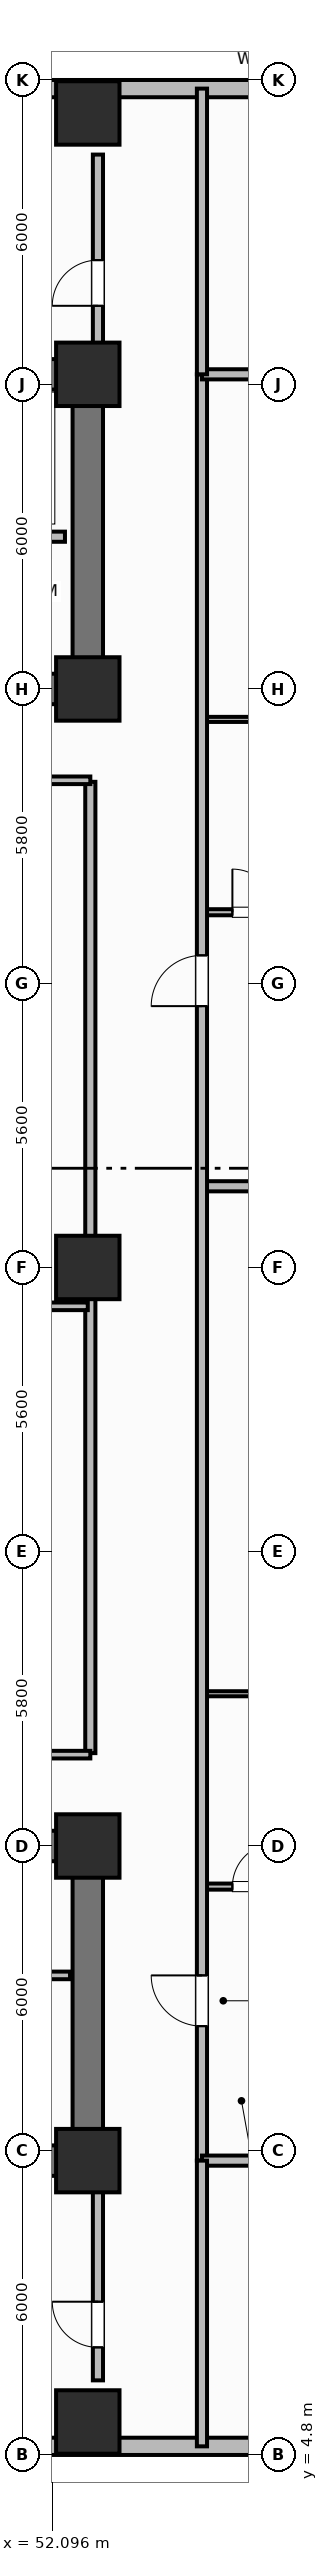
"""IFC4 building model, lengths in metres.
Left out: names, types, materials, properties, quantities, classifications, styles, units other than length and angle.
Written with IfcOpenShell. Run it as: python <this file> out.ifc"""

import sys

from ifc_helpers import new_model, si_unit, direction, frame, frame_2d, origin, origin_2d, place, context, subcontext, project, spatial, rectangle, extrude, element, fill, save


model = new_model("IFC4")
c1 = context("Model", 3, precision=1e-05, world=origin(), true_north=direction((0.0, 1.0)))
c2 = subcontext(c1, "Body", "Model", "MODEL_VIEW")
j1 = project(units=[si_unit("LENGTHUNIT", "METRE"), si_unit("PLANEANGLEUNIT", "RADIAN")], contexts=[c1])
p1 = place(None, origin())
s1 = spatial("IfcSite", under=j1, at=p1, CompositionType="ELEMENT")
p2 = place(p1, origin())
s2 = spatial("IfcBuilding", under=s1, at=p2, CompositionType="ELEMENT")
p3 = place(p2, frame((0.0, 0.0, 47.3)))
s3 = spatial("IfcBuildingStorey", under=s2, at=p3, CompositionType="ELEMENT", Elevation=47.3)
p4 = place(p3, frame((52.8, 10.6, 0.0), z_axis=(0.0, 0.0, 1.0), x_axis=(-1.0, 0.0, 0.0)))
e1 = element("IfcWall", 1, at=p4, inside=s3, PredefinedType="SHEAR", context=c2, shape_type="SweptSolid", body=[
    extrude(rectangle(XDim=27.2, YDim=0.6, at=frame_2d((13.6, 0.0))), origin(), (0.0, 0.0, 1.0), 3.7),
])
p5 = place(p3, frame((52.8, 10.9, 0.0), z_axis=(0.0, 0.0, 1.0), x_axis=(0.0, 1.0, 0.0)))
e2 = element("IfcWall", 2, at=p5, inside=s3, PredefinedType="SHEAR", context=c2, shape_type="SweptSolid", body=[
    extrude(rectangle(XDim=5.6, YDim=0.6, at=frame_2d((2.8, 0.0))), origin(), (0.0, 0.0, 1.0), 3.7),
])
p6 = place(p3, frame((25.6, 16.8, 0.0), z_axis=(0.0, 0.0, 1.0), x_axis=(1.0, 0.0, 0.0)))
e3 = element("IfcWall", 3, at=p6, inside=s3, PredefinedType="SHEAR", context=c2, shape_type="SweptSolid", body=[
    extrude(rectangle(XDim=27.2, YDim=0.6, at=frame_2d((13.6, 0.0))), origin(), (0.0, 0.0, 1.0), 3.7),
])
p7 = place(p6, frame((1.8, 0.0, 0.0)))
e4 = element("IfcOpeningElement", 4, at=p7, cuts=e3, PredefinedType="OPENING", context=c2, shape_type="SweptSolid", body=[
    extrude(rectangle(XDim=1.1, YDim=2.15, at=frame_2d((0.55, 1.075))), frame((0.0, 0.31, 0.0), z_axis=(0.0, -1.0, 0.0), x_axis=(1.0, 0.0, 0.0)), (0.0, 0.0, 1.0), 0.62),
])
p8 = place(p6, frame((5.6, 0.0, 0.0)))
e5 = element("IfcOpeningElement", 5, at=p8, cuts=e3, PredefinedType="OPENING", context=c2, shape_type="SweptSolid", body=[
    extrude(rectangle(XDim=0.85, YDim=2.1, at=frame_2d((0.425, 1.05))), frame((0.0, 0.31, 0.0), z_axis=(0.0, -1.0, 0.0), x_axis=(1.0, 0.0, 0.0)), (0.0, 0.0, 1.0), 0.62),
])
p9 = place(p6, frame((13.0, 0.0, 0.0)))
e6 = element("IfcOpeningElement", 6, at=p9, cuts=e3, PredefinedType="OPENING", context=c2, shape_type="SweptSolid", body=[
    extrude(rectangle(XDim=1.2, YDim=2.15, at=frame_2d((0.6, 1.075))), frame((0.0, 0.31, 0.0), z_axis=(0.0, -1.0, 0.0), x_axis=(1.0, 0.0, 0.0)), (0.0, 0.0, 1.0), 0.62),
])
p10 = place(p6, frame((20.4, 0.0, 0.0)))
e7 = element("IfcOpeningElement", 7, at=p10, cuts=e3, PredefinedType="OPENING", context=c2, shape_type="SweptSolid", body=[
    extrude(rectangle(XDim=1.3, YDim=2.2, at=frame_2d((0.65, 1.1))), frame((0.0, 0.31, 0.0), z_axis=(0.0, -1.0, 0.0), x_axis=(1.0, 0.0, 0.0)), (0.0, 0.0, 1.0), 0.62),
])
p11 = place(p6, frame((24.65, 0.0, 0.0)))
e8 = element("IfcOpeningElement", 8, at=p11, cuts=e3, PredefinedType="OPENING", context=c2, shape_type="SweptSolid", body=[
    extrude(rectangle(XDim=0.85, YDim=2.1, at=frame_2d((0.425, 1.05))), frame((0.0, 0.31, 0.0), z_axis=(0.0, -1.0, 0.0), x_axis=(1.0, 0.0, 0.0)), (0.0, 0.0, 1.0), 0.62),
])
p12 = place(p3, frame((25.6, 45.8, 0.0), z_axis=(0.0, 0.0, 1.0), x_axis=(1.0, 0.0, 0.0)))
e9 = element("IfcWall", 9, at=p12, inside=s3, PredefinedType="SHEAR", context=c2, shape_type="SweptSolid", body=[
    extrude(rectangle(XDim=27.2, YDim=0.6, at=frame_2d((13.6, 0.0))), origin(), (0.0, 0.0, 1.0), 3.7),
])
p13 = place(p3, frame((52.8, 39.9, 0.0), z_axis=(0.0, 0.0, 1.0), x_axis=(0.0, 1.0, 0.0)))
e10 = element("IfcWall", 10, at=p13, inside=s3, PredefinedType="SHEAR", context=c2, shape_type="SweptSolid", body=[
    extrude(rectangle(XDim=5.6, YDim=0.6, at=frame_2d((2.8, 0.0))), origin(), (0.0, 0.0, 1.0), 3.7),
])
p14 = place(p3, frame((52.8, 39.6, 0.0), z_axis=(0.0, 0.0, 1.0), x_axis=(-1.0, 0.0, 0.0)))
e11 = element("IfcWall", 11, at=p14, inside=s3, PredefinedType="SHEAR", context=c2, shape_type="SweptSolid", body=[
    extrude(rectangle(XDim=27.2, YDim=0.6, at=frame_2d((13.6, 0.0))), origin(), (0.0, 0.0, 1.0), 3.7),
])
p15 = place(p14, frame((24.2, 0.0, 0.0)))
e12 = element("IfcOpeningElement", 12, at=p15, cuts=e11, PredefinedType="OPENING", context=c2, shape_type="SweptSolid", body=[
    extrude(rectangle(XDim=1.1, YDim=2.15, at=frame_2d((0.55, 1.075))), frame((0.0, 0.31, 0.0), z_axis=(0.0, -1.0, 0.0), x_axis=(1.0, 0.0, 0.0)), (0.0, 0.0, 1.0), 0.62),
])
p16 = place(p14, frame((20.55, 0.0, 0.0)))
e13 = element("IfcOpeningElement", 13, at=p16, cuts=e11, PredefinedType="OPENING", context=c2, shape_type="SweptSolid", body=[
    extrude(rectangle(XDim=0.95, YDim=2.1, at=frame_2d((0.475, 1.05))), frame((0.0, 0.31, 0.0), z_axis=(0.0, -1.0, 0.0), x_axis=(1.0, 0.0, 0.0)), (0.0, 0.0, 1.0), 0.62),
])
p17 = place(p14, frame((15.1, 0.0, 0.0)))
e14 = element("IfcOpeningElement", 14, at=p17, cuts=e11, PredefinedType="OPENING", context=c2, shape_type="SweptSolid", body=[
    extrude(rectangle(XDim=1.2, YDim=2.15, at=frame_2d((0.6, 1.075))), frame((0.0, 0.31, 0.0), z_axis=(0.0, -1.0, 0.0), x_axis=(1.0, 0.0, 0.0)), (0.0, 0.0, 1.0), 0.62),
])
p18 = place(p14, frame((11.6, 0.0, 0.0)))
e15 = element("IfcOpeningElement", 15, at=p18, cuts=e11, PredefinedType="OPENING", context=c2, shape_type="SweptSolid", body=[
    extrude(rectangle(XDim=0.9, YDim=2.1, at=frame_2d((0.45, 1.05))), frame((0.0, 0.31, 0.0), z_axis=(0.0, -1.0, 0.0), x_axis=(1.0, 0.0, 0.0)), (0.0, 0.0, 1.0), 0.62),
])
p19 = place(p14, frame((4.8, 0.0, 0.0)))
e16 = element("IfcOpeningElement", 16, at=p19, cuts=e11, PredefinedType="OPENING", context=c2, shape_type="SweptSolid", body=[
    extrude(rectangle(XDim=0.85, YDim=2.1, at=frame_2d((0.425, 1.05))), frame((0.0, 0.31, 0.0), z_axis=(0.0, -1.0, 0.0), x_axis=(1.0, 0.0, 0.0)), (0.0, 0.0, 1.0), 0.62),
])
p20 = place(p14, frame((1.9, 0.0, 0.0)))
e17 = element("IfcOpeningElement", 17, at=p20, cuts=e11, PredefinedType="OPENING", context=c2, shape_type="SweptSolid", body=[
    extrude(rectangle(XDim=0.85, YDim=2.1, at=frame_2d((0.425, 1.05))), frame((0.0, 0.31, 0.0), z_axis=(0.0, -1.0, 0.0), x_axis=(1.0, 0.0, 0.0)), (0.0, 0.0, 1.0), 0.62),
])
for number, where, z_axis, x_axis in (
    (18, (52.8, 10.6, 0.0), (0.0, 0.0, 1.0), (1.0, 0.0, 0.0)),
    (19, (52.8, 16.8, 0.0), (0.0, 0.0, 1.0), (1.0, 0.0, 0.0)),
    (20, (52.8, 39.6, 0.0), (0.0, 0.0, 1.0), (1.0, 0.0, 0.0)),
    (21, (52.8, 45.8, 0.0), (0.0, 0.0, 1.0), (1.0, 0.0, 0.0)),
    (22, (52.8, 28.2, 0.0), (0.0, 0.0, 1.0), (1.0, 0.0, 0.0)),
    (23, (52.8, 5.45, 0.0), (0.0, 0.0, 1.0), (1.0, 0.0, 0.0)),
    (24, (52.8, 50.95, 0.0), (0.0, 0.0, 1.0), (1.0, 0.0, 0.0)),
):
    element("IfcColumn", number, at=place(p3, frame(where, z_axis=z_axis, x_axis=x_axis)), inside=s3, PredefinedType="COLUMN", context=c2, shape_type="SweptSolid", body=[
        extrude(rectangle(XDim=1.25, YDim=1.25, at=origin_2d()), origin(), (0.0, 0.0, 1.0), 3.7),
    ])
p21 = place(p3, frame((42.4, 4.97, 0.0), z_axis=(0.0, 0.0, 1.0), x_axis=(1.0, 0.0, 0.0)))
e25 = element("IfcWall", 25, at=p21, inside=s3, PredefinedType="SOLIDWALL", context=c2, shape_type="SweptSolid", body=[
    extrude(rectangle(XDim=17.4, YDim=0.34, at=frame_2d((8.7, 0.0))), origin(), (0.0, 0.0, 1.0), 2.7),
])
p22 = place(p21, frame((4.68, 0.0, 0.68)))
e26 = element("IfcOpeningElement", 26, at=p22, cuts=e25, PredefinedType="OPENING", context=c2, shape_type="SweptSolid", body=[
    extrude(rectangle(XDim=1.6, YDim=1.9, at=frame_2d((0.8, 0.95))), frame((0.0, 0.18, 0.0), z_axis=(0.0, -1.0, 0.0), x_axis=(1.0, 0.0, 0.0)), (0.0, 0.0, 1.0), 0.36),
])
p23 = place(p21, frame((7.55, 0.0, 0.68)))
e27 = element("IfcOpeningElement", 27, at=p23, cuts=e25, PredefinedType="OPENING", context=c2, shape_type="SweptSolid", body=[
    extrude(rectangle(XDim=1.6, YDim=1.9, at=frame_2d((0.8, 0.95))), frame((0.0, 0.18, 0.0), z_axis=(0.0, -1.0, 0.0), x_axis=(1.0, 0.0, 0.0)), (0.0, 0.0, 1.0), 0.36),
])
p24 = place(p21, frame((14.34, 0.0, 0.68)))
e28 = element("IfcOpeningElement", 28, at=p24, cuts=e25, PredefinedType="OPENING", context=c2, shape_type="SweptSolid", body=[
    extrude(rectangle(XDim=1.6, YDim=1.9, at=frame_2d((0.8, 0.95))), frame((0.0, 0.18, 0.0), z_axis=(0.0, -1.0, 0.0), x_axis=(1.0, 0.0, 0.0)), (0.0, 0.0, 1.0), 0.36),
])
p25 = place(p3, frame((59.8, 51.43, 0.0), z_axis=(0.0, 0.0, 1.0), x_axis=(-1.0, 0.0, 0.0)))
e29 = element("IfcWall", 29, at=p25, inside=s3, PredefinedType="SOLIDWALL", context=c2, shape_type="SweptSolid", body=[
    extrude(rectangle(XDim=17.4, YDim=0.34, at=frame_2d((8.7, 0.0))), origin(), (0.0, 0.0, 1.0), 2.7),
])
p26 = place(p25, frame((1.613, 0.0, 0.68)))
e30 = element("IfcOpeningElement", 30, at=p26, cuts=e29, PredefinedType="OPENING", context=c2, shape_type="SweptSolid", body=[
    extrude(rectangle(XDim=2.1, YDim=1.9, at=frame_2d((1.05, 0.95))), frame((0.0, 0.18, 0.0), z_axis=(0.0, -1.0, 0.0), x_axis=(1.0, 0.0, 0.0)), (0.0, 0.0, 1.0), 0.36),
])
p27 = place(p25, frame((9.663, 0.0, 0.68)))
e31 = element("IfcOpeningElement", 31, at=p27, cuts=e29, PredefinedType="OPENING", context=c2, shape_type="SweptSolid", body=[
    extrude(rectangle(XDim=2.1, YDim=1.9, at=frame_2d((1.05, 0.95))), frame((0.0, 0.18, 0.0), z_axis=(0.0, -1.0, 0.0), x_axis=(1.0, 0.0, 0.0)), (0.0, 0.0, 1.0), 0.36),
])
p28 = place(p3, frame((49.6, 14.25, 0.0), z_axis=(0.0, 0.0, 1.0), x_axis=(1.0, 0.0, 0.0)))
e32 = element("IfcWall", 32, at=p28, inside=s3, PredefinedType="PARTITIONING", context=c2, shape_type="SweptSolid", body=[
    extrude(rectangle(XDim=2.85, YDim=0.15, at=frame_2d((1.425, 0.0))), origin(), (0.0, 0.0, 1.0), 2.53),
])
p29 = place(p28, frame((0.9, 0.0, 0.0)))
e33 = element("IfcOpeningElement", 33, at=p29, cuts=e32, PredefinedType="OPENING", context=c2, shape_type="SweptSolid", body=[
    extrude(rectangle(XDim=0.85, YDim=2.1, at=frame_2d((0.425, 1.05))), frame((0.0, 0.085, 0.0), z_axis=(0.0, -1.0, 0.0), x_axis=(1.0, 0.0, 0.0)), (0.0, 0.0, 1.0), 0.17),
])
p30 = place(p3, frame((52.35, 42.6, 0.0), z_axis=(0.0, 0.0, 1.0), x_axis=(-1.0, 0.0, 0.0)))
e34 = element("IfcWall", 34, at=p30, inside=s3, PredefinedType="PARTITIONING", context=c2, shape_type="SweptSolid", body=[
    extrude(rectangle(XDim=8.8, YDim=0.2, at=frame_2d((4.4, 0.0))), origin(), (0.0, 0.0, 1.0), 2.53),
])
p31 = place(p3, frame((52.85, 18.63, 0.0), z_axis=(0.0, 0.0, 1.0), x_axis=(0.0, 1.0, 0.0)))
e35 = element("IfcWall", 35, at=p31, inside=s3, PredefinedType="PARTITIONING", context=c2, shape_type="SweptSolid", body=[
    extrude(rectangle(XDim=19.14, YDim=0.2, at=frame_2d((9.57, 0.0))), origin(), (0.0, 0.0, 1.0), 2.53),
])
for number, where, z_axis, x_axis in (
    (36, (40.35, 18.6, 0.0), (0.0, 0.0, 1.0), (1.0, 0.0, 0.0)),
    (37, (40.35, 37.8, 0.0), (0.0, 0.0, 1.0), (1.0, 0.0, 0.0)),
):
    element("IfcWall", number, at=place(p3, frame(where, z_axis=z_axis, x_axis=x_axis)), inside=s3, PredefinedType="PARTITIONING", context=c2, shape_type="SweptSolid", body=[
        extrude(rectangle(XDim=12.5, YDim=0.15, at=frame_2d((6.25, 0.0))), origin(), (0.0, 0.0, 1.0), 2.53),
    ])
p32 = place(p3, frame((40.38, 27.434, 0.0), z_axis=(0.0, 0.0, 1.0), x_axis=(1.0, 0.0, 0.0)))
e38 = element("IfcWall", 38, at=p32, inside=s3, PredefinedType="PARTITIONING", context=c2, shape_type="SweptSolid", body=[
    extrude(rectangle(XDim=12.42, YDim=0.15, at=frame_2d((6.21, 0.0))), origin(), (0.0, 0.0, 1.0), 2.53),
])
p33 = place(p3, frame((55.05, 16.0, 0.0), z_axis=(0.0, 0.0, 1.0), x_axis=(1.0, 0.0, 0.0)))
e39 = element("IfcWall", 39, at=p33, inside=s3, PredefinedType="PARTITIONING", context=c2, shape_type="SweptSolid", body=[
    extrude(rectangle(XDim=2.25, YDim=0.12, at=frame_2d((1.125, 0.0))), origin(), (0.0, 0.0, 1.0), 2.53),
])
p34 = place(p33, frame((0.6, 0.0, 0.0)))
e40 = element("IfcOpeningElement", 40, at=p34, cuts=e39, PredefinedType="OPENING", context=c2, shape_type="SweptSolid", body=[
    extrude(rectangle(XDim=0.85, YDim=2.1, at=frame_2d((0.425, 1.05))), frame((0.0, 0.07, 0.0), z_axis=(0.0, -1.0, 0.0), x_axis=(1.0, 0.0, 0.0)), (0.0, 0.0, 1.0), 0.14),
])
p35 = place(p3, frame((55.05, 19.8, 0.0), z_axis=(0.0, 0.0, 1.0), x_axis=(1.0, 0.0, 0.0)))
e41 = element("IfcWall", 41, at=p35, inside=s3, PredefinedType="PARTITIONING", context=c2, shape_type="SweptSolid", body=[
    extrude(rectangle(XDim=2.25, YDim=0.1, at=frame_2d((1.125, 0.0))), origin(), (0.0, 0.0, 1.0), 2.53),
])
p36 = place(p3, frame((55.05, 29.8, 0.0), z_axis=(0.0, 0.0, 1.0), x_axis=(1.0, 0.0, 0.0)))
e42 = element("IfcWall", 42, at=p36, inside=s3, PredefinedType="PARTITIONING", context=c2, shape_type="SweptSolid", body=[
    extrude(rectangle(XDim=8.066, YDim=0.2, at=frame_2d((4.033, 0.0))), origin(), (0.0, 0.0, 1.0), 2.53),
])
p37 = place(p3, frame((55.05, 35.2, 0.0), z_axis=(0.0, 0.0, 1.0), x_axis=(1.0, 0.0, 0.0)))
e43 = element("IfcWall", 43, at=p37, inside=s3, PredefinedType="PARTITIONING", context=c2, shape_type="SweptSolid", body=[
    extrude(rectangle(XDim=2.25, YDim=0.12, at=frame_2d((1.125, 0.0))), origin(), (0.0, 0.0, 1.0), 2.53),
])
p38 = place(p37, frame((0.6, 0.0, 0.0)))
e44 = element("IfcOpeningElement", 44, at=p38, cuts=e43, PredefinedType="OPENING", context=c2, shape_type="SweptSolid", body=[
    extrude(rectangle(XDim=0.85, YDim=2.1, at=frame_2d((0.425, 1.05))), frame((0.0, 0.07, 0.0), z_axis=(0.0, -1.0, 0.0), x_axis=(1.0, 0.0, 0.0)), (0.0, 0.0, 1.0), 0.14),
])
p39 = place(p3, frame((55.05, 39.0, 0.0), z_axis=(0.0, 0.0, 1.0), x_axis=(1.0, 0.0, 0.0)))
e45 = element("IfcWall", 45, at=p39, inside=s3, PredefinedType="PARTITIONING", context=c2, shape_type="SweptSolid", body=[
    extrude(rectangle(XDim=2.25, YDim=0.1, at=frame_2d((1.125, 0.0))), origin(), (0.0, 0.0, 1.0), 2.53),
])
p40 = place(p3, frame((55.05, 10.6, 0.0), z_axis=(0.0, 0.0, 1.0), x_axis=(0.0, 1.0, 0.0)))
e46 = element("IfcWall", 46, at=p40, inside=s3, PredefinedType="PARTITIONING", context=c2, shape_type="SweptSolid", body=[
    extrude(rectangle(XDim=35.2, YDim=0.2, at=frame_2d((17.6, 0.0))), origin(), (0.0, 0.0, 1.0), 2.53),
])
p41 = place(p40, frame((2.65, 0.0, 0.0)))
e47 = element("IfcOpeningElement", 47, at=p41, cuts=e46, PredefinedType="OPENING", context=c2, shape_type="SweptSolid", body=[
    extrude(rectangle(XDim=1.0, YDim=2.15, at=frame_2d((0.5, 1.075))), frame((0.0, 0.11, 0.0), z_axis=(0.0, -1.0, 0.0), x_axis=(1.0, 0.0, 0.0)), (0.0, 0.0, 1.0), 0.22),
])
p42 = place(p40, frame((22.75, 0.0, 0.0)))
e48 = element("IfcOpeningElement", 48, at=p42, cuts=e46, PredefinedType="OPENING", context=c2, shape_type="SweptSolid", body=[
    extrude(rectangle(XDim=1.0, YDim=2.15, at=frame_2d((0.5, 1.075))), frame((0.0, 0.11, 0.0), z_axis=(0.0, -1.0, 0.0), x_axis=(1.0, 0.0, 0.0)), (0.0, 0.0, 1.0), 0.22),
])
for number, where, z_axis, x_axis in (
    (49, (55.05, 10.6, 0.0), (0.0, 0.0, 1.0), (1.0, 0.0, 0.0)),
    (50, (55.05, 45.8, 0.0), (0.0, 0.0, 1.0), (1.0, 0.0, 0.0)),
):
    element("IfcWall", number, at=place(p3, frame(where, z_axis=z_axis, x_axis=x_axis)), inside=s3, PredefinedType="PARTITIONING", context=c2, shape_type="SweptSolid", body=[
        extrude(rectangle(XDim=8.36, YDim=0.2, at=frame_2d((4.18, 0.0))), origin(), (0.0, 0.0, 1.0), 2.53),
    ])
p43 = place(p3, frame((55.05, 4.97, 0.0), z_axis=(0.0, 0.0, 1.0), x_axis=(0.0, 1.0, 0.0)))
e51 = element("IfcWall", 51, at=p43, inside=s3, PredefinedType="PARTITIONING", context=c2, shape_type="SweptSolid", body=[
    extrude(rectangle(XDim=5.63, YDim=0.2, at=frame_2d((2.815, 0.0))), origin(), (0.0, 0.0, 1.0), 2.53),
])
p44 = place(p3, frame((55.05, 45.8, 0.0), z_axis=(0.0, 0.0, 1.0), x_axis=(0.0, 1.0, 0.0)))
e52 = element("IfcWall", 52, at=p44, inside=s3, PredefinedType="PARTITIONING", context=c2, shape_type="SweptSolid", body=[
    extrude(rectangle(XDim=5.63, YDim=0.2, at=frame_2d((2.815, 0.0))), origin(), (0.0, 0.0, 1.0), 2.53),
])
p45 = place(p3, frame((53.0, 6.27, 0.0), z_axis=(0.0, 0.0, 1.0), x_axis=(0.0, 1.0, 0.0)))
e53 = element("IfcWall", 53, at=p45, inside=s3, PredefinedType="PARTITIONING", context=c2, shape_type="SweptSolid", body=[
    extrude(rectangle(XDim=4.03, YDim=0.2, at=frame_2d((2.015, 0.0))), origin(), (0.0, 0.0, 1.0), 2.53),
])
p46 = place(p45, frame((0.65, 0.0, 0.0)))
e54 = element("IfcOpeningElement", 54, at=p46, cuts=e53, PredefinedType="OPENING", context=c2, shape_type="SweptSolid", body=[
    extrude(rectangle(XDim=0.9, YDim=2.1, at=frame_2d((0.45, 1.05))), frame((0.0, 0.11, 0.0), z_axis=(0.0, -1.0, 0.0), x_axis=(1.0, 0.0, 0.0)), (0.0, 0.0, 1.0), 0.22),
])
p47 = place(p3, frame((53.0, 46.1, 0.0), z_axis=(0.0, 0.0, 1.0), x_axis=(0.0, 1.0, 0.0)))
e55 = element("IfcWall", 55, at=p47, inside=s3, PredefinedType="PARTITIONING", context=c2, shape_type="SweptSolid", body=[
    extrude(rectangle(XDim=4.03, YDim=0.2, at=frame_2d((2.015, 0.0))), origin(), (0.0, 0.0, 1.0), 2.53),
])
p48 = place(p47, frame((1.05, 0.0, 0.0)))
e56 = element("IfcOpeningElement", 56, at=p48, cuts=e55, PredefinedType="OPENING", context=c2, shape_type="SweptSolid", body=[
    extrude(rectangle(XDim=0.9, YDim=2.1, at=frame_2d((0.45, 1.05))), frame((0.0, 0.11, 0.0), z_axis=(0.0, -1.0, 0.0), x_axis=(1.0, 0.0, 0.0)), (0.0, 0.0, 1.0), 0.22),
])
p49 = place(p34, origin())
e57 = element("IfcDoor", 57, at=p49, inside=s3, OperationType="SINGLE_SWING_RIGHT", PredefinedType="DOOR", context=c2, shape_type="SweptSolid", body=[
    extrude(rectangle(XDim=0.85, YDim=2.1, at=frame_2d((0.425, 1.05))), frame((0.0, 0.025, 0.0), z_axis=(0.0, -1.0, 0.0), x_axis=(1.0, 0.0, 0.0)), (0.0, 0.0, 1.0), 0.05),
])
fill(e40, e57)
p50 = place(p38, origin())
e58 = element("IfcDoor", 58, at=p50, inside=s3, OperationType="SINGLE_SWING_LEFT", PredefinedType="DOOR", context=c2, shape_type="SweptSolid", body=[
    extrude(rectangle(XDim=0.85, YDim=2.1, at=frame_2d((0.425, 1.05))), frame((0.0, 0.025, 0.0), z_axis=(0.0, -1.0, 0.0), x_axis=(1.0, 0.0, 0.0)), (0.0, 0.0, 1.0), 0.05),
])
fill(e44, e58)
p51 = place(p41, origin())
e59 = element("IfcDoor", 59, at=p51, inside=s3, OperationType="SINGLE_SWING_RIGHT", PredefinedType="DOOR", context=c2, shape_type="SweptSolid", body=[
    extrude(rectangle(XDim=1.0, YDim=2.15, at=frame_2d((0.5, 1.075))), frame((0.0, 0.025, 0.0), z_axis=(0.0, -1.0, 0.0), x_axis=(1.0, 0.0, 0.0)), (0.0, 0.0, 1.0), 0.05),
])
fill(e47, e59)
p52 = place(p42, origin())
e60 = element("IfcDoor", 60, at=p52, inside=s3, OperationType="SINGLE_SWING_LEFT", PredefinedType="DOOR", context=c2, shape_type="SweptSolid", body=[
    extrude(rectangle(XDim=1.0, YDim=2.15, at=frame_2d((0.5, 1.075))), frame((0.0, 0.025, 0.0), z_axis=(0.0, -1.0, 0.0), x_axis=(1.0, 0.0, 0.0)), (0.0, 0.0, 1.0), 0.05),
])
fill(e48, e60)
p53 = place(p46, origin())
e61 = element("IfcDoor", 61, at=p53, inside=s3, OperationType="SINGLE_SWING_RIGHT", PredefinedType="DOOR", context=c2, shape_type="SweptSolid", body=[
    extrude(rectangle(XDim=0.9, YDim=2.1, at=frame_2d((0.45, 1.05))), frame((0.0, 0.025, 0.0), z_axis=(0.0, -1.0, 0.0), x_axis=(1.0, 0.0, 0.0)), (0.0, 0.0, 1.0), 0.05),
])
fill(e54, e61)
p54 = place(p48, origin())
e62 = element("IfcDoor", 62, at=p54, inside=s3, OperationType="SINGLE_SWING_LEFT", PredefinedType="DOOR", context=c2, shape_type="SweptSolid", body=[
    extrude(rectangle(XDim=0.9, YDim=2.1, at=frame_2d((0.45, 1.05))), frame((0.0, 0.025, 0.0), z_axis=(0.0, -1.0, 0.0), x_axis=(1.0, 0.0, 0.0)), (0.0, 0.0, 1.0), 0.05),
])
fill(e56, e62)
save(model, sys.argv[1])
